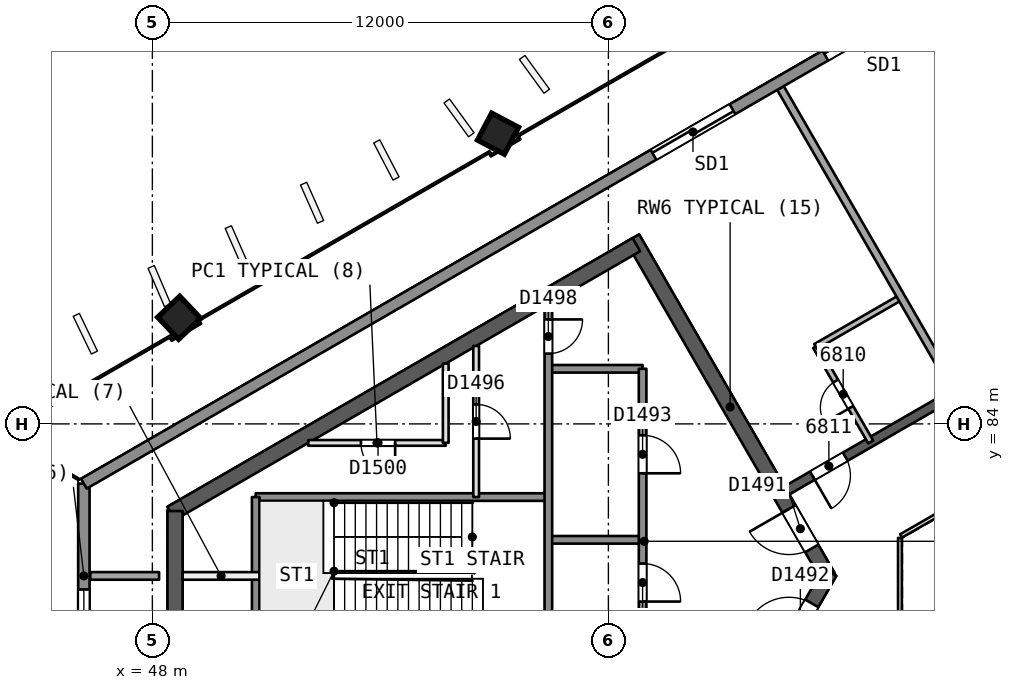
"""IFC4 building model, lengths in metres.
Left out: names, types, materials, properties, quantities, classifications, styles, units other than length and angle.
Written with IfcOpenShell. Run it as: python <this file> out.ifc"""

import sys

from ifc_helpers import new_model, si_unit, direction, frame, frame_2d, origin, origin_2d, place, context, subcontext, project, spatial, rectangle, extrude, element, fill, save


model = new_model("IFC4")
c1 = context("Model", 3, precision=1e-05, world=origin(), true_north=direction((0.0, 1.0)))
c2 = subcontext(c1, "Body", "Model", "MODEL_VIEW")
j1 = project(units=[si_unit("LENGTHUNIT", "METRE"), si_unit("PLANEANGLEUNIT", "RADIAN")], contexts=[c1])
p1 = place(None, origin())
s1 = spatial("IfcSite", under=j1, at=p1, CompositionType="ELEMENT")
p2 = place(p1, origin())
s2 = spatial("IfcBuilding", under=s1, at=p2, CompositionType="ELEMENT")
p3 = place(p2, frame((0.0, 0.0, 277.5)))
s3 = spatial("IfcBuildingStorey", under=s2, at=p3, CompositionType="ELEMENT", Elevation=277.5)
p4 = place(p3, frame((65.769, 80.0, 0.0), z_axis=(0.0, 0.0, 1.0), x_axis=(-0.50000177223, 0.866024380585, 0.0)))
e1 = element("IfcWall", 1, at=p4, inside=s3, PredefinedType="SHEAR", context=c2, shape_type="SweptSolid", body=[
    extrude(rectangle(XDim=10.265, YDim=0.4, at=frame_2d((5.132, 0.0))), origin(), (0.0, 0.0, 1.0), 3.7),
])
p5 = place(p4, frame((0.834, 0.0, 0.0)))
e2 = element("IfcOpeningElement", 2, at=p5, cuts=e1, PredefinedType="OPENING", context=c2, shape_type="SweptSolid", body=[
    extrude(rectangle(XDim=1.2, YDim=2.1, at=frame_2d((0.6, 1.05))), frame((0.0, 0.21, 0.0), z_axis=(0.0, -1.0, 0.0), x_axis=(1.0, 0.0, 0.0)), (0.0, 0.0, 1.0), 0.421),
])
p6 = place(p3, frame((60.737, 88.716, 0.0), z_axis=(0.0, 0.0, 1.0), x_axis=(-0.866028812667, -0.499994095595, 0.0)))
e3 = element("IfcWall", 3, at=p6, inside=s3, PredefinedType="SHEAR", context=c2, shape_type="SweptSolid", body=[
    extrude(rectangle(XDim=14.134, YDim=0.4, at=frame_2d((7.067, 0.0))), origin(), (0.0, 0.0, 1.0), 3.7),
])
p7 = place(p3, frame((48.597, 81.707, 0.0), z_axis=(0.0, 0.0, 1.0), x_axis=(0.0, -1.0, 0.0)))
e4 = element("IfcWall", 4, at=p7, inside=s3, PredefinedType="SHEAR", context=c2, shape_type="SweptSolid", body=[
    extrude(rectangle(XDim=3.53, YDim=0.4, at=frame_2d((1.765, 0.0))), origin(), (0.0, 0.0, 1.0), 3.7),
])
p8 = place(p3, frame((60.737, 71.284, 0.0), z_axis=(0.0, 0.0, 1.0), x_axis=(0.50000547566, 0.866022242388, 0.0)))
e5 = element("IfcWall", 5, at=p8, inside=s3, PredefinedType="SHEAR", context=c2, shape_type="SweptSolid", body=[
    extrude(rectangle(XDim=10.18, YDim=0.4, at=frame_2d((5.09, 0.0))), origin(), (0.0, 0.0, 1.0), 3.7),
])
p9 = place(p8, frame((8.03, 0.0, 0.0)))
e6 = element("IfcOpeningElement", 6, at=p9, cuts=e5, PredefinedType="OPENING", context=c2, shape_type="SweptSolid", body=[
    extrude(rectangle(XDim=1.2, YDim=2.1, at=frame_2d((0.6, 1.05))), frame((0.0, 0.21, 0.0), z_axis=(0.0, -1.0, 0.0), x_axis=(1.0, 0.0, 0.0)), (0.0, 0.0, 1.0), 0.421),
])
p10 = place(p3, frame((78.2, 90.046, 0.0), z_axis=(0.0, 0.0, 1.0), x_axis=(-0.866026492143, -0.499998114903, 0.0)))
e7 = element("IfcWall", 7, at=p10, inside=s3, PredefinedType="SHEAR", context=c2, shape_type="SweptSolid", body=[
    extrude(rectangle(XDim=15.588, YDim=0.25, at=frame_2d((7.794, 0.0))), origin(), (0.0, 0.0, 1.0), 3.3),
])
p11 = place(p10, frame((3.372, 0.0, 0.0)))
e8 = element("IfcOpeningElement", 8, at=p11, cuts=e7, PredefinedType="OPENING", context=c2, shape_type="SweptSolid", body=[
    extrude(rectangle(XDim=1.0, YDim=2.1, at=frame_2d((0.5, 1.05))), frame((0.0, 0.135, 0.0), z_axis=(0.0, -1.0, 0.0), x_axis=(1.0, 0.0, 0.0)), (0.0, 0.0, 1.0), 0.271),
])
p12 = place(p10, frame((8.594, 0.0, 0.0)))
e9 = element("IfcOpeningElement", 9, at=p12, cuts=e7, PredefinedType="OPENING", context=c2, shape_type="SweptSolid", body=[
    extrude(rectangle(XDim=1.0, YDim=2.1, at=frame_2d((0.5, 1.05))), frame((0.0, 0.135, 0.0), z_axis=(0.0, -1.0, 0.0), x_axis=(1.0, 0.0, 0.0)), (0.0, 0.0, 1.0), 0.271),
])
p13 = place(p10, frame((13.816, 0.0, 0.0)))
e10 = element("IfcOpeningElement", 10, at=p13, cuts=e7, PredefinedType="OPENING", context=c2, shape_type="SweptSolid", body=[
    extrude(rectangle(XDim=1.0, YDim=2.1, at=frame_2d((0.5, 1.05))), frame((0.0, 0.135, 0.0), z_axis=(0.0, -1.0, 0.0), x_axis=(1.0, 0.0, 0.0)), (0.0, 0.0, 1.0), 0.271),
])
p14 = place(p3, frame((57.073, 91.65, 0.0), z_axis=(0.019328516974, -0.012138044789, 0.999739504221), x_axis=(-0.500219757057, 0.865663279165, 0.020181222843)))
e11 = element("IfcColumn", 11, at=p14, inside=s3, PredefinedType="COLUMN", context=c2, shape_type="SweptSolid", body=[
    extrude(rectangle(XDim=0.8, YDim=0.8, at=origin_2d()), origin(), (0.0, 0.0, 1.0), 3.701),
])
p15 = place(p3, frame((48.672, 86.8, 0.0), z_axis=(0.02855911485, -0.006793507689, 0.999569019734), x_axis=(-0.500407643461, 0.865554709988, 0.020180049142)))
e12 = element("IfcColumn", 12, at=p15, inside=s3, PredefinedType="COLUMN", context=c2, shape_type="SweptSolid", body=[
    extrude(rectangle(XDim=0.8, YDim=0.8, at=origin_2d()), origin(), (0.0, 0.0, 1.0), 3.702),
])
p16 = place(p3, frame((64.528, 92.838, 0.0), z_axis=(0.0, 0.0, 1.0), x_axis=(0.500006385204, -0.866021717254, 0.0)))
e13 = element("IfcWall", 13, at=p16, inside=s3, PredefinedType="PARTITIONING", context=c2, shape_type="SweptSolid", body=[
    extrude(rectangle(XDim=9.254, YDim=0.2, at=frame_2d((4.627, 0.0))), origin(), (0.0, 0.0, 1.0), 3.3),
])
p17 = place(p3, frame((66.903, 83.524, 0.0), z_axis=(0.0, 0.0, 1.0), x_axis=(-0.499987231761, 0.866032775405, 0.0)))
e14 = element("IfcWall", 14, at=p17, inside=s3, PredefinedType="PARTITIONING", context=c2, shape_type="SweptSolid", body=[
    extrude(rectangle(XDim=2.9, YDim=0.15, at=frame_2d((1.45, 0.0))), origin(), (0.0, 0.0, 1.0), 3.3),
])
p18 = place(p17, frame((1.05, 0.0, 0.0)))
e15 = element("IfcOpeningElement", 15, at=p18, cuts=e14, PredefinedType="OPENING", context=c2, shape_type="SweptSolid", body=[
    extrude(rectangle(XDim=0.8, YDim=2.1, at=frame_2d((0.4, 1.05))), frame((0.0, 0.085, 0.0), z_axis=(0.0, -1.0, 0.0), x_axis=(1.0, 0.0, 0.0)), (0.0, 0.0, 1.0), 0.171),
])
p19 = place(p3, frame((65.453, 86.035, 0.0), z_axis=(0.0, 0.0, 1.0), x_axis=(0.866021400173, 0.500006934395, 0.0)))
e16 = element("IfcWall", 16, at=p19, inside=s3, PredefinedType="PARTITIONING", context=c2, shape_type="SweptSolid", body=[
    extrude(rectangle(XDim=2.6, YDim=0.15, at=frame_2d((1.3, 0.0))), origin(), (0.0, 0.0, 1.0), 3.3),
])
p20 = place(p3, frame((46.368, 80.0, 0.0), z_axis=(0.0, 0.0, 1.0), x_axis=(1.0, 0.0, 0.0)))
e17 = element("IfcWall", 17, at=p20, inside=s3, PredefinedType="PARTITIONING", context=c2, shape_type="SweptSolid", body=[
    extrude(rectangle(XDim=1.809, YDim=0.2, at=frame_2d((0.905, 0.0))), origin(), (0.0, 0.0, 1.0), 3.3),
])
p21 = place(p3, frame((46.198, 77.573, 0.0), z_axis=(0.0, 0.0, 1.0), x_axis=(0.0, 1.0, 0.0)))
e18 = element("IfcWall", 18, at=p21, inside=s3, PredefinedType="SOLIDWALL", context=c2, shape_type="SweptSolid", body=[
    extrude(rectangle(XDim=4.854, YDim=0.3, at=frame_2d((2.427, 0.0))), origin(), (0.0, 0.0, 1.0), 3.3),
])
p22 = place(p21, frame((0.27, 0.0, 0.9)))
e19 = element("IfcOpeningElement", 19, at=p22, cuts=e18, PredefinedType="OPENING", context=c2, shape_type="SweptSolid", body=[
    extrude(rectangle(XDim=1.8, YDim=1.5, at=frame_2d((0.9, 0.75))), frame((0.0, 0.161, 0.0), z_axis=(0.0, -1.0, 0.0), x_axis=(1.0, 0.0, 0.0)), (0.0, 0.0, 1.0), 0.321),
])
p23 = place(p3, frame((46.198, 82.427, 0.0), z_axis=(0.0, 0.0, 1.0), x_axis=(0.866024279277, 0.500001947699, 0.0)))
e20 = element("IfcWall", 20, at=p23, inside=s3, PredefinedType="SOLIDWALL", context=c2, shape_type="SweptSolid", body=[
    extrude(rectangle(XDim=47.46, YDim=0.3, at=frame_2d((23.73, 0.0))), origin(), (0.0, 0.0, 1.0), 3.3),
])
p24 = place(p23, frame((17.308, 0.0, 0.0)))
e21 = element("IfcOpeningElement", 21, at=p24, cuts=e20, PredefinedType="OPENING", context=c2, shape_type="SweptSolid", body=[
    extrude(rectangle(XDim=2.4, YDim=2.4, at=frame_2d((1.2, 1.2))), frame((0.0, 0.161, 0.0), z_axis=(0.0, -1.0, 0.0), x_axis=(1.0, 0.0, 0.0)), (0.0, 0.0, 1.0), 0.321),
])
p25 = place(p23, frame((22.53, 0.0, 0.0)))
e22 = element("IfcOpeningElement", 22, at=p25, cuts=e20, PredefinedType="OPENING", context=c2, shape_type="SweptSolid", body=[
    extrude(rectangle(XDim=2.4, YDim=2.4, at=frame_2d((1.2, 1.2))), frame((0.0, 0.161, 0.0), z_axis=(0.0, -1.0, 0.0), x_axis=(1.0, 0.0, 0.0)), (0.0, 0.0, 1.0), 0.321),
])
p26 = place(p23, frame((27.752, 0.0, 0.0)))
e23 = element("IfcOpeningElement", 23, at=p26, cuts=e20, PredefinedType="OPENING", context=c2, shape_type="SweptSolid", body=[
    extrude(rectangle(XDim=2.4, YDim=2.4, at=frame_2d((1.2, 1.2))), frame((0.0, 0.161, 0.0), z_axis=(0.0, -1.0, 0.0), x_axis=(1.0, 0.0, 0.0)), (0.0, 0.0, 1.0), 0.321),
])
p27 = place(p3, frame((60.9, 85.45, 0.0), z_axis=(0.0, 0.0, 1.0), x_axis=(-1.0, 0.0, 0.0)))
e24 = element("IfcWall", 24, at=p27, inside=s3, PredefinedType="SOLIDWALL", context=c2, shape_type="SweptSolid", body=[
    extrude(rectangle(XDim=2.48, YDim=0.2, at=frame_2d((1.24, 0.0))), origin(), (0.0, 0.0, 1.0), 3.3),
])
p28 = place(p3, frame((55.72, 83.5, 0.0), z_axis=(0.0, 0.0, 1.0), x_axis=(-1.0, 0.0, 0.0)))
e25 = element("IfcWall", 25, at=p28, inside=s3, PredefinedType="PARTITIONING", context=c2, shape_type="SweptSolid", body=[
    extrude(rectangle(XDim=3.618, YDim=0.15, at=frame_2d((1.809, 0.0))), origin(), (0.0, 0.0, 1.0), 3.3),
])
p29 = place(p28, frame((1.332, 0.0, 0.0)))
e26 = element("IfcOpeningElement", 26, at=p29, cuts=e25, PredefinedType="OPENING", context=c2, shape_type="SweptSolid", body=[
    extrude(rectangle(XDim=0.9, YDim=2.1, at=frame_2d((0.45, 1.05))), frame((0.0, 0.085, 0.0), z_axis=(0.0, -1.0, 0.0), x_axis=(1.0, 0.0, 0.0)), (0.0, 0.0, 1.0), 0.171),
])
p30 = place(p3, frame((58.42, 82.075, 0.0), z_axis=(0.0, 0.0, 1.0), x_axis=(-1.0, 0.0, 0.0)))
e27 = element("IfcWall", 27, at=p30, inside=s3, PredefinedType="SOLIDWALL", context=c2, shape_type="SweptSolid", body=[
    extrude(rectangle(XDim=7.7, YDim=0.2, at=frame_2d((3.85, 0.0))), origin(), (0.0, 0.0, 1.0), 3.3),
])
p31 = place(p3, frame((60.9, 80.95, 0.0), z_axis=(0.0, 0.0, 1.0), x_axis=(-1.0, 0.0, 0.0)))
e28 = element("IfcWall", 28, at=p31, inside=s3, PredefinedType="SOLIDWALL", context=c2, shape_type="SweptSolid", body=[
    extrude(rectangle(XDim=2.48, YDim=0.2, at=frame_2d((1.24, 0.0))), origin(), (0.0, 0.0, 1.0), 3.3),
])
p32 = place(p3, frame((50.82, 80.0, 0.0), z_axis=(0.0, 0.0, 1.0), x_axis=(-1.0, 0.0, 0.0)))
e29 = element("IfcWall", 29, at=p32, inside=s3, PredefinedType="PARTITIONING", context=c2, shape_type="SweptSolid", body=[
    extrude(rectangle(XDim=2.023, YDim=0.2, at=frame_2d((1.012, 0.0))), origin(), (0.0, 0.0, 1.0), 3.3),
])
p33 = place(p3, frame((60.9, 85.45, 0.0), z_axis=(0.0, 0.0, 1.0), x_axis=(0.0, -1.0, 0.0)))
e30 = element("IfcWall", 30, at=p33, inside=s3, PredefinedType="SOLIDWALL", context=c2, shape_type="SweptSolid", body=[
    extrude(rectangle(XDim=10.9, YDim=0.2, at=frame_2d((5.45, 0.0))), origin(), (0.0, 0.0, 1.0), 3.3),
])
p34 = place(p33, frame((1.75, 0.0, 0.0)))
e31 = element("IfcOpeningElement", 31, at=p34, cuts=e30, PredefinedType="OPENING", context=c2, shape_type="SweptSolid", body=[
    extrude(rectangle(XDim=1.0, YDim=2.1, at=frame_2d((0.5, 1.05))), frame((0.0, 0.11, 0.0), z_axis=(0.0, -1.0, 0.0), x_axis=(1.0, 0.0, 0.0)), (0.0, 0.0, 1.0), 0.221),
])
p35 = place(p33, frame((5.125, 0.0, 0.0)))
e32 = element("IfcOpeningElement", 32, at=p35, cuts=e30, PredefinedType="OPENING", context=c2, shape_type="SweptSolid", body=[
    extrude(rectangle(XDim=1.0, YDim=2.1, at=frame_2d((0.5, 1.05))), frame((0.0, 0.11, 0.0), z_axis=(0.0, -1.0, 0.0), x_axis=(1.0, 0.0, 0.0)), (0.0, 0.0, 1.0), 0.221),
])
p36 = place(p33, frame((7.375, 0.0, 0.0)))
e33 = element("IfcOpeningElement", 33, at=p36, cuts=e30, PredefinedType="OPENING", context=c2, shape_type="SweptSolid", body=[
    extrude(rectangle(XDim=1.0, YDim=2.1, at=frame_2d((0.5, 1.05))), frame((0.0, 0.11, 0.0), z_axis=(0.0, -1.0, 0.0), x_axis=(1.0, 0.0, 0.0)), (0.0, 0.0, 1.0), 0.221),
])
p37 = place(p3, frame((58.42, 87.148, 0.0), z_axis=(0.0, 0.0, 1.0), x_axis=(0.0, -1.0, 0.0)))
e34 = element("IfcWall", 34, at=p37, inside=s3, PredefinedType="SOLIDWALL", context=c2, shape_type="SweptSolid", body=[
    extrude(rectangle(XDim=10.698, YDim=0.2, at=frame_2d((5.349, 0.0))), origin(), (0.0, 0.0, 1.0), 3.3),
])
p38 = place(p37, frame((0.399, 0.0, 0.0)))
e35 = element("IfcOpeningElement", 35, at=p38, cuts=e34, PredefinedType="OPENING", context=c2, shape_type="SweptSolid", body=[
    extrude(rectangle(XDim=0.9, YDim=2.1, at=frame_2d((0.45, 1.05))), frame((0.0, 0.11, 0.0), z_axis=(0.0, -1.0, 0.0), x_axis=(1.0, 0.0, 0.0)), (0.0, 0.0, 1.0), 0.221),
])
p39 = place(p3, frame((56.52, 86.051, 0.0), z_axis=(0.0, 0.0, 1.0), x_axis=(0.0, -1.0, 0.0)))
e36 = element("IfcWall", 36, at=p39, inside=s3, PredefinedType="PARTITIONING", context=c2, shape_type="SweptSolid", body=[
    extrude(rectangle(XDim=3.976, YDim=0.15, at=frame_2d((1.988, 0.0))), origin(), (0.0, 0.0, 1.0), 3.3),
])
p40 = place(p39, frame((1.538, 0.0, 0.0)))
e37 = element("IfcOpeningElement", 37, at=p40, cuts=e36, PredefinedType="OPENING", context=c2, shape_type="SweptSolid", body=[
    extrude(rectangle(XDim=0.9, YDim=2.1, at=frame_2d((0.45, 1.05))), frame((0.0, 0.085, 0.0), z_axis=(0.0, -1.0, 0.0), x_axis=(1.0, 0.0, 0.0)), (0.0, 0.0, 1.0), 0.171),
])
p41 = place(p3, frame((55.72, 85.589, 0.0), z_axis=(0.0, 0.0, 1.0), x_axis=(0.0, -1.0, 0.0)))
e38 = element("IfcWall", 38, at=p41, inside=s3, PredefinedType="PARTITIONING", context=c2, shape_type="SweptSolid", body=[
    extrude(rectangle(XDim=2.089, YDim=0.15, at=frame_2d((1.044, 0.0))), origin(), (0.0, 0.0, 1.0), 3.3),
])
p42 = place(p3, frame((50.72, 82.075, 0.0), z_axis=(0.0, 0.0, 1.0), x_axis=(0.0, -1.0, 0.0)))
e39 = element("IfcWall", 39, at=p42, inside=s3, PredefinedType="SOLIDWALL", context=c2, shape_type="SweptSolid", body=[
    extrude(rectangle(XDim=4.15, YDim=0.2, at=frame_2d((2.075, 0.0))), origin(), (0.0, 0.0, 1.0), 3.3),
])
p43 = place(p3, frame((77.738, 86.846, 0.0), z_axis=(0.0, 0.0, 1.0), x_axis=(-0.866026658274, -0.499997827154, 0.0)))
e40 = element("IfcWall", 40, at=p43, inside=s3, PredefinedType="PARTITIONING", context=c2, shape_type="SweptSolid", body=[
    extrude(rectangle(XDim=11.588, YDim=0.1, at=frame_2d((5.794, 0.0))), origin(), (0.0, 0.0, 1.0), 3.3),
])
p44 = place(p3, frame((67.672, 81.0, 0.0), z_axis=(0.0, 0.0, 1.0), x_axis=(0.0, -1.0, 0.0)))
e41 = element("IfcWall", 41, at=p44, inside=s3, PredefinedType="PARTITIONING", context=c2, shape_type="SweptSolid", body=[
    extrude(rectangle(XDim=2.0, YDim=0.1, at=frame_2d((1.0, 0.0))), origin(), (0.0, 0.0, 1.0), 3.3),
])
p45 = place(p18, origin())
e42 = element("IfcDoor", 42, at=p45, inside=s3, OperationType="SINGLE_SWING_LEFT", PredefinedType="NOTDEFINED", context=c2, shape_type="SweptSolid", body=[
    extrude(rectangle(XDim=0.8, YDim=2.1, at=frame_2d((0.4, 1.05))), frame((0.0, 0.025, 0.0), z_axis=(0.0, -1.0, 0.0), x_axis=(1.0, 0.0, 0.0)), (0.0, 0.0, 1.0), 0.05),
])
fill(e15, e42)
p46 = place(p13, origin())
e43 = element("IfcDoor", 43, at=p46, inside=s3, OperationType="SINGLE_SWING_RIGHT", PredefinedType="NOTDEFINED", context=c2, shape_type="SweptSolid", body=[
    extrude(rectangle(XDim=1.0, YDim=2.1, at=frame_2d((0.5, 1.05))), frame((0.0, 0.025, 0.0), z_axis=(0.0, -1.0, 0.0), x_axis=(1.0, 0.0, 0.0)), (0.0, 0.0, 1.0), 0.05),
])
fill(e10, e43)
p47 = place(p22, origin())
e44 = element("IfcWindow", 44, at=p47, inside=s3, PartitioningType="SINGLE_PANEL", PredefinedType="WINDOW", context=c2, shape_type="SweptSolid", body=[
    extrude(rectangle(XDim=1.8, YDim=1.5, at=frame_2d((0.9, 0.75))), frame((0.0, 0.03, 0.0), z_axis=(0.0, -1.0, 0.0), x_axis=(1.0, 0.0, 0.0)), (0.0, 0.0, 1.0), 0.06),
])
fill(e19, e44)
p48 = place(p24, origin())
e45 = element("IfcDoor", 45, at=p48, inside=s3, OperationType="SLIDING_TO_LEFT", PredefinedType="NOTDEFINED", context=c2, shape_type="SweptSolid", body=[
    extrude(rectangle(XDim=2.4, YDim=2.4, at=frame_2d((1.2, 1.2))), frame((0.0, 0.025, 0.0), z_axis=(0.0, -1.0, 0.0), x_axis=(1.0, 0.0, 0.0)), (0.0, 0.0, 1.0), 0.05),
])
fill(e21, e45)
p49 = place(p25, origin())
e46 = element("IfcDoor", 46, at=p49, inside=s3, OperationType="SLIDING_TO_RIGHT", PredefinedType="NOTDEFINED", context=c2, shape_type="SweptSolid", body=[
    extrude(rectangle(XDim=2.4, YDim=2.4, at=frame_2d((1.2, 1.2))), frame((0.0, 0.025, 0.0), z_axis=(0.0, -1.0, 0.0), x_axis=(1.0, 0.0, 0.0)), (0.0, 0.0, 1.0), 0.05),
])
fill(e22, e46)
p50 = place(p5, origin())
e47 = element("IfcDoor", 47, at=p50, inside=s3, OperationType="SINGLE_SWING_RIGHT", PredefinedType="NOTDEFINED", context=c2, shape_type="SweptSolid", body=[
    extrude(rectangle(XDim=1.2, YDim=2.1, at=frame_2d((0.6, 1.05))), frame((0.0, 0.025, 0.0), z_axis=(0.0, -1.0, 0.0), x_axis=(1.0, 0.0, 0.0)), (0.0, 0.0, 1.0), 0.05),
])
fill(e2, e47)
p51 = place(p9, origin())
e48 = element("IfcDoor", 48, at=p51, inside=s3, OperationType="SINGLE_SWING_LEFT", PredefinedType="NOTDEFINED", context=c2, shape_type="SweptSolid", body=[
    extrude(rectangle(XDim=1.2, YDim=2.1, at=frame_2d((0.6, 1.05))), frame((0.0, 0.025, 0.0), z_axis=(0.0, -1.0, 0.0), x_axis=(1.0, 0.0, 0.0)), (0.0, 0.0, 1.0), 0.05),
])
fill(e6, e48)
p52 = place(p34, origin())
e49 = element("IfcDoor", 49, at=p52, inside=s3, OperationType="SINGLE_SWING_RIGHT", PredefinedType="NOTDEFINED", context=c2, shape_type="SweptSolid", body=[
    extrude(rectangle(XDim=1.0, YDim=2.1, at=frame_2d((0.5, 1.05))), frame((0.0, 0.025, 0.0), z_axis=(0.0, -1.0, 0.0), x_axis=(1.0, 0.0, 0.0)), (0.0, 0.0, 1.0), 0.05),
])
fill(e31, e49)
p53 = place(p35, origin())
e50 = element("IfcDoor", 50, at=p53, inside=s3, OperationType="SINGLE_SWING_RIGHT", PredefinedType="NOTDEFINED", context=c2, shape_type="SweptSolid", body=[
    extrude(rectangle(XDim=1.0, YDim=2.1, at=frame_2d((0.5, 1.05))), frame((0.0, 0.025, 0.0), z_axis=(0.0, -1.0, 0.0), x_axis=(1.0, 0.0, 0.0)), (0.0, 0.0, 1.0), 0.05),
])
fill(e32, e50)
p54 = place(p40, origin())
e51 = element("IfcDoor", 51, at=p54, inside=s3, OperationType="SINGLE_SWING_RIGHT", PredefinedType="NOTDEFINED", context=c2, shape_type="SweptSolid", body=[
    extrude(rectangle(XDim=0.9, YDim=2.1, at=frame_2d((0.45, 1.05))), frame((0.0, 0.025, 0.0), z_axis=(0.0, -1.0, 0.0), x_axis=(1.0, 0.0, 0.0)), (0.0, 0.0, 1.0), 0.05),
])
fill(e37, e51)
p55 = place(p38, origin())
e52 = element("IfcDoor", 52, at=p55, inside=s3, OperationType="SINGLE_SWING_LEFT", PredefinedType="NOTDEFINED", context=c2, shape_type="SweptSolid", body=[
    extrude(rectangle(XDim=0.9, YDim=2.1, at=frame_2d((0.45, 1.05))), frame((0.0, 0.025, 0.0), z_axis=(0.0, -1.0, 0.0), x_axis=(1.0, 0.0, 0.0)), (0.0, 0.0, 1.0), 0.05),
])
fill(e35, e52)
p56 = place(p29, origin())
e53 = element("IfcDoor", 53, at=p56, inside=s3, OperationType="SINGLE_SWING_LEFT", PredefinedType="NOTDEFINED", context=c2, shape_type="SweptSolid", body=[
    extrude(rectangle(XDim=0.9, YDim=2.1, at=frame_2d((0.45, 1.05))), frame((0.0, 0.025, 0.0), z_axis=(0.0, -1.0, 0.0), x_axis=(1.0, 0.0, 0.0)), (0.0, 0.0, 1.0), 0.05),
])
fill(e26, e53)
save(model, sys.argv[1])
